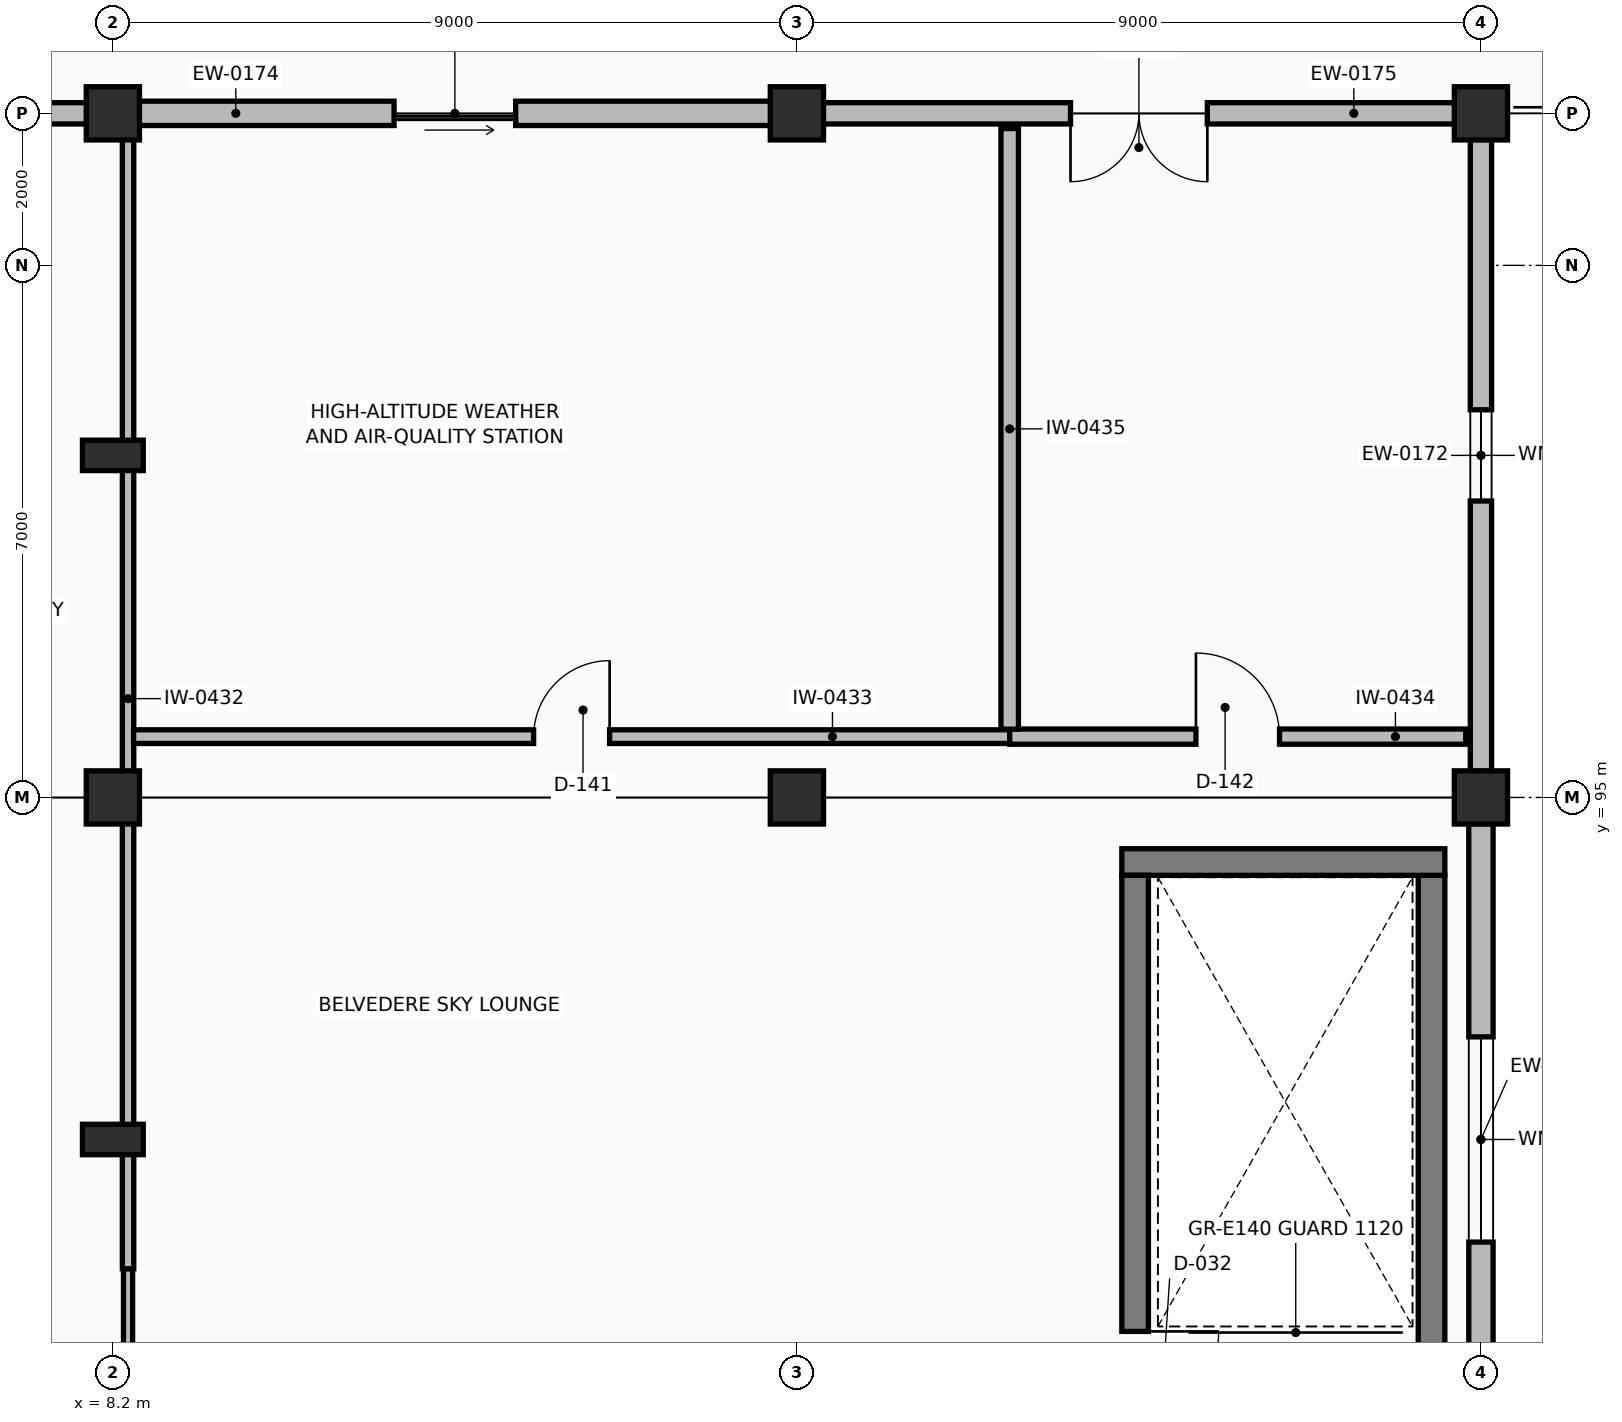
"""IFC4 building model, lengths in metres.
Left out: names, types, materials, properties, quantities, classifications, styles, units other than length and angle.
Written with IfcOpenShell. Run it as: python <this file> out.ifc"""

import sys

from ifc_helpers import new_model, si_unit, direction, frame, frame_2d, origin, origin_2d, place, context, subcontext, project, spatial, rectangle, extrude, element, fill, save


model = new_model("IFC4")
c1 = context("Model", 3, precision=1e-05, world=origin(), true_north=direction((0.0, 1.0)))
c2 = subcontext(c1, "Body", "Model", "MODEL_VIEW")
j1 = project(units=[si_unit("LENGTHUNIT", "METRE"), si_unit("PLANEANGLEUNIT", "RADIAN")], contexts=[c1])
p1 = place(None, origin())
s1 = spatial("IfcSite", under=j1, at=p1, CompositionType="ELEMENT")
p2 = place(p1, origin())
s2 = spatial("IfcBuilding", under=s1, at=p2, CompositionType="ELEMENT")
p3 = place(p2, frame((0.0, 0.0, 18.9)))
s3 = spatial("IfcBuildingStorey", under=s2, at=p3, CompositionType="ELEMENT", Elevation=18.9)
for number, where, z_axis, x_axis in (
    (1, (8.2, 95.0, 0.0), (0.0, 0.0, 1.0), (1.0, 0.0, 0.0)),
    (2, (8.2, 104.0, 0.0), (0.0, 0.0, 1.0), (1.0, 0.0, 0.0)),
    (3, (17.2, 95.0, 0.0), (0.0, 0.0, 1.0), (1.0, 0.0, 0.0)),
    (4, (17.2, 104.0, 0.0), (0.0, 0.0, 1.0), (1.0, 0.0, 0.0)),
    (5, (26.2, 95.0, 0.0), (0.0, 0.0, 1.0), (1.0, 0.0, 0.0)),
    (6, (26.2, 104.0, 0.0), (0.0, 0.0, 1.0), (1.0, 0.0, 0.0)),
):
    element("IfcColumn", number, at=place(p3, frame(where, z_axis=z_axis, x_axis=x_axis)), inside=s3, PredefinedType="COLUMN", context=c2, shape_type="SweptSolid", body=[
        extrude(rectangle(XDim=0.7, YDim=0.7, at=origin_2d()), origin(), (0.0, 0.0, 1.0), 4.5),
    ])
for number, where, z_axis, x_axis in (
    (7, (8.2, 90.5, 0.0), (0.0, 0.0, 1.0), (0.0, 1.0, 0.0)),
    (8, (8.2, 99.5, 0.0), (0.0, 0.0, 1.0), (0.0, 1.0, 0.0)),
):
    element("IfcColumn", number, at=place(p3, frame(where, z_axis=z_axis, x_axis=x_axis)), inside=s3, PredefinedType="PILASTER", context=c2, shape_type="SweptSolid", body=[
        extrude(rectangle(XDim=0.4, YDim=0.8, at=origin_2d()), origin(), (0.0, 0.0, 1.0), 4.5),
    ])
p4 = place(p3, frame((26.2, 86.345, 0.0), z_axis=(0.0, 0.0, 1.0), x_axis=(0.0, 1.0, 0.0)))
e9 = element("IfcWall", 9, at=p4, inside=s3, PredefinedType="SOLIDWALL", context=c2, shape_type="SweptSolid", body=[
    extrude(rectangle(XDim=8.31, YDim=0.32, at=frame_2d((4.155, 0.0))), origin(), (0.0, 0.0, 1.0), 4.19),
])
p5 = place(p4, frame((2.805, 0.0, 0.9)))
e10 = element("IfcOpeningElement", 10, at=p5, cuts=e9, PredefinedType="OPENING", context=c2, shape_type="SweptSolid", body=[
    extrude(rectangle(XDim=2.7, YDim=1.5, at=frame_2d((1.35, 0.75))), frame((0.0, 0.17, 0.0), z_axis=(0.0, -1.0, 0.0), x_axis=(1.0, 0.0, 0.0)), (0.0, 0.0, 1.0), 0.34),
])
p6 = place(p3, frame((26.2, 95.345, 0.0), z_axis=(0.0, 0.0, 1.0), x_axis=(0.0, 1.0, 0.0)))
e11 = element("IfcWall", 11, at=p6, inside=s3, PredefinedType="SOLIDWALL", context=c2, shape_type="SweptSolid", body=[
    extrude(rectangle(XDim=8.31, YDim=0.28, at=frame_2d((4.155, 0.0))), origin(), (0.0, 0.0, 1.0), 4.19),
])
p7 = place(p6, frame((3.555, 0.0, 0.9)))
e12 = element("IfcOpeningElement", 12, at=p7, cuts=e11, PredefinedType="OPENING", context=c2, shape_type="SweptSolid", body=[
    extrude(rectangle(XDim=1.2, YDim=1.5, at=frame_2d((0.6, 0.75))), frame((0.0, 0.15, 0.0), z_axis=(0.0, -1.0, 0.0), x_axis=(1.0, 0.0, 0.0)), (0.0, 0.0, 1.0), 0.3),
])
p8 = place(p3, frame((7.855, 104.0, 0.0), z_axis=(0.0, 0.0, 1.0), x_axis=(-1.0, 0.0, 0.0)))
e13 = element("IfcWall", 13, at=p8, inside=s3, PredefinedType="SOLIDWALL", context=c2, shape_type="SweptSolid", body=[
    extrude(rectangle(XDim=4.855, YDim=0.28, at=frame_2d((2.427, 0.0))), origin(), (0.0, 0.0, 1.0), 4.19),
])
p9 = place(p3, frame((16.855, 104.0, 0.0), z_axis=(0.0, 0.0, 1.0), x_axis=(-1.0, 0.0, 0.0)))
e14 = element("IfcWall", 14, at=p9, inside=s3, PredefinedType="SOLIDWALL", context=c2, shape_type="SweptSolid", body=[
    extrude(rectangle(XDim=8.31, YDim=0.32, at=frame_2d((4.155, 0.0))), origin(), (0.0, 0.0, 1.0), 4.19),
])
p10 = place(p9, frame((3.355, 0.0, 0.0)))
e15 = element("IfcOpeningElement", 15, at=p10, cuts=e14, PredefinedType="OPENING", context=c2, shape_type="SweptSolid", body=[
    extrude(rectangle(XDim=1.6, YDim=2.3, at=frame_2d((0.8, 1.15))), frame((0.0, 0.17, 0.0), z_axis=(0.0, -1.0, 0.0), x_axis=(1.0, 0.0, 0.0)), (0.0, 0.0, 1.0), 0.34),
])
p11 = place(p3, frame((25.855, 104.0, 0.0), z_axis=(0.0, 0.0, 1.0), x_axis=(-1.0, 0.0, 0.0)))
e16 = element("IfcWall", 16, at=p11, inside=s3, PredefinedType="SOLIDWALL", context=c2, shape_type="SweptSolid", body=[
    extrude(rectangle(XDim=8.31, YDim=0.28, at=frame_2d((4.155, 0.0))), origin(), (0.0, 0.0, 1.0), 4.19),
])
p12 = place(p11, frame((3.255, 0.0, 0.0)))
e17 = element("IfcOpeningElement", 17, at=p12, cuts=e16, PredefinedType="OPENING", context=c2, shape_type="SweptSolid", body=[
    extrude(rectangle(XDim=1.8, YDim=2.3, at=frame_2d((0.9, 1.15))), frame((0.0, 0.15, 0.0), z_axis=(0.0, -1.0, 0.0), x_axis=(1.0, 0.0, 0.0)), (0.0, 0.0, 1.0), 0.3),
])
p13 = place(p3, frame((25.55, 86.425, 0.0), z_axis=(0.0, 0.0, 1.0), x_axis=(0.0, 1.0, 0.0)))
e18 = element("IfcWall", 18, at=p13, inside=s3, PredefinedType="SHEAR", context=c2, shape_type="SweptSolid", body=[
    extrude(rectangle(XDim=7.55, YDim=0.35, at=frame_2d((3.775, 0.0))), origin(), (0.0, 0.0, 1.0), 4.28),
])
p14 = place(p3, frame((25.725, 94.15, 0.0), z_axis=(0.0, 0.0, 1.0), x_axis=(-1.0, 0.0, 0.0)))
e19 = element("IfcWall", 19, at=p14, inside=s3, PredefinedType="SHEAR", context=c2, shape_type="SweptSolid", body=[
    extrude(rectangle(XDim=4.25, YDim=0.35, at=frame_2d((2.125, 0.0))), origin(), (0.0, 0.0, 1.0), 4.28),
])
p15 = place(p3, frame((21.65, 93.975, 0.0), z_axis=(0.0, 0.0, 1.0), x_axis=(0.0, -1.0, 0.0)))
e20 = element("IfcWall", 20, at=p15, inside=s3, PredefinedType="SHEAR", context=c2, shape_type="SweptSolid", body=[
    extrude(rectangle(XDim=7.55, YDim=0.35, at=frame_2d((3.775, 0.0))), origin(), (0.0, 0.0, 1.0), 4.28),
])
p16 = place(p15, frame((6.0, 0.0, 0.0)))
e21 = element("IfcOpeningElement", 21, at=p16, cuts=e20, PredefinedType="OPENING", context=c2, shape_type="SweptSolid", body=[
    extrude(rectangle(XDim=1.1, YDim=2.2, at=frame_2d((0.55, 1.1))), frame((0.0, 0.185, 0.0), z_axis=(0.0, -1.0, 0.0), x_axis=(1.0, 0.0, 0.0)), (0.0, 0.0, 1.0), 0.37),
])
p17 = place(p3, frame((8.4, 85.8, 0.0), z_axis=(0.0, 0.0, 1.0), x_axis=(0.0, 1.0, 0.0)))
e22 = element("IfcWall", 22, at=p17, inside=s3, PredefinedType="PARTITIONING", context=c2, shape_type="SweptSolid", body=[
    extrude(rectangle(XDim=3.0, YDim=0.12, at=frame_2d((1.5, 0.0))), origin(), (0.0, 0.0, 1.0), 4.135),
])
p18 = place(p17, frame((1.0, 0.0, 0.0)))
e23 = element("IfcOpeningElement", 23, at=p18, cuts=e22, PredefinedType="OPENING", context=c2, shape_type="SweptSolid", body=[
    extrude(rectangle(XDim=1.0, YDim=2.15, at=frame_2d((0.5, 1.075))), frame((0.0, 0.07, 0.0), z_axis=(0.0, -1.0, 0.0), x_axis=(1.0, 0.0, 0.0)), (0.0, 0.0, 1.0), 0.14),
])
p19 = place(p3, frame((8.4, 88.8, 0.0), z_axis=(0.0, 0.0, 1.0), x_axis=(0.0, 1.0, 0.0)))
e24 = element("IfcWall", 24, at=p19, inside=s3, PredefinedType="PARTITIONING", context=c2, shape_type="SweptSolid", body=[
    extrude(rectangle(XDim=15.0, YDim=0.15, at=frame_2d((7.5, 0.0))), origin(), (0.0, 0.0, 1.0), 4.135),
])
p20 = place(p3, frame((8.473, 95.8, 0.0), z_axis=(0.0, 0.0, 1.0), x_axis=(1.0, 0.0, 0.0)))
e25 = element("IfcWall", 25, at=p20, inside=s3, PredefinedType="STANDARD", context=c2, shape_type="SweptSolid", body=[
    extrude(rectangle(XDim=11.527, YDim=0.18, at=frame_2d((5.764, 0.0))), origin(), (0.0, 0.0, 1.0), 4.135),
])
p21 = place(p20, frame((5.263, 0.0, 0.0)))
e26 = element("IfcOpeningElement", 26, at=p21, cuts=e25, PredefinedType="OPENING", context=c2, shape_type="SweptSolid", body=[
    extrude(rectangle(XDim=1.0, YDim=2.15, at=frame_2d((0.5, 1.075))), frame((0.0, 0.1, 0.0), z_axis=(0.0, -1.0, 0.0), x_axis=(1.0, 0.0, 0.0)), (0.0, 0.0, 1.0), 0.2),
])
p22 = place(p3, frame((20.0, 95.8, 0.0), z_axis=(0.0, 0.0, 1.0), x_axis=(1.0, 0.0, 0.0)))
e27 = element("IfcWall", 27, at=p22, inside=s3, PredefinedType="PARTITIONING", context=c2, shape_type="SweptSolid", body=[
    extrude(rectangle(XDim=6.0, YDim=0.2, at=frame_2d((3.0, 0.0))), origin(), (0.0, 0.0, 1.0), 4.135),
])
p23 = place(p22, frame((2.45, 0.0, 0.0)))
e28 = element("IfcOpeningElement", 28, at=p23, cuts=e27, PredefinedType="OPENING", context=c2, shape_type="SweptSolid", body=[
    extrude(rectangle(XDim=1.1, YDim=2.2, at=frame_2d((0.55, 1.1))), frame((0.0, 0.11, 0.0), z_axis=(0.0, -1.0, 0.0), x_axis=(1.0, 0.0, 0.0)), (0.0, 0.0, 1.0), 0.22),
])
p24 = place(p3, frame((20.0, 95.898, 0.0), z_axis=(0.0, 0.0, 1.0), x_axis=(0.0, 1.0, 0.0)))
e29 = element("IfcWall", 29, at=p24, inside=s3, PredefinedType="PARTITIONING", context=c2, shape_type="SweptSolid", body=[
    extrude(rectangle(XDim=7.902, YDim=0.23, at=frame_2d((3.951, 0.0))), origin(), (0.0, 0.0, 1.0), 4.135),
])
p25 = place(p5, origin())
e30 = element("IfcWindow", 30, at=p25, inside=s3, PartitioningType="SINGLE_PANEL", PredefinedType="WINDOW", context=c2, shape_type="SweptSolid", body=[
    extrude(rectangle(XDim=2.7, YDim=1.5, at=frame_2d((1.35, 0.75))), frame((0.0, 0.03, 0.0), z_axis=(0.0, -1.0, 0.0), x_axis=(1.0, 0.0, 0.0)), (0.0, 0.0, 1.0), 0.06),
])
fill(e10, e30)
p26 = place(p7, origin())
e31 = element("IfcWindow", 31, at=p26, inside=s3, PartitioningType="SINGLE_PANEL", PredefinedType="WINDOW", context=c2, shape_type="SweptSolid", body=[
    extrude(rectangle(XDim=1.2, YDim=1.5, at=frame_2d((0.6, 0.75))), frame((0.0, 0.03, 0.0), z_axis=(0.0, -1.0, 0.0), x_axis=(1.0, 0.0, 0.0)), (0.0, 0.0, 1.0), 0.06),
])
fill(e12, e31)
p27 = place(p10, origin())
e32 = element("IfcDoor", 32, at=p27, inside=s3, OperationType="SLIDING_TO_LEFT", PredefinedType="DOOR", context=c2, shape_type="SweptSolid", body=[
    extrude(rectangle(XDim=1.6, YDim=2.3, at=frame_2d((0.8, 1.15))), frame((0.0, 0.025, 0.0), z_axis=(0.0, -1.0, 0.0), x_axis=(1.0, 0.0, 0.0)), (0.0, 0.0, 1.0), 0.05),
])
fill(e15, e32)
p28 = place(p12, origin())
e33 = element("IfcDoor", 33, at=p28, inside=s3, OperationType="DOUBLE_SWING_LEFT", PredefinedType="DOOR", context=c2, shape_type="SweptSolid", body=[
    extrude(rectangle(XDim=1.8, YDim=2.3, at=frame_2d((0.9, 1.15))), frame((0.0, 0.025, 0.0), z_axis=(0.0, -1.0, 0.0), x_axis=(1.0, 0.0, 0.0)), (0.0, 0.0, 1.0), 0.05),
])
fill(e17, e33)
p29 = place(p16, origin())
e34 = element("IfcDoor", 34, at=p29, inside=s3, OperationType="SINGLE_SWING_LEFT", PredefinedType="DOOR", context=c2, shape_type="SweptSolid", body=[
    extrude(rectangle(XDim=1.1, YDim=2.2, at=frame_2d((0.55, 1.1))), frame((0.0, 0.025, 0.0), z_axis=(0.0, -1.0, 0.0), x_axis=(1.0, 0.0, 0.0)), (0.0, 0.0, 1.0), 0.05),
])
fill(e21, e34)
p30 = place(p21, origin())
e35 = element("IfcDoor", 35, at=p30, inside=s3, OperationType="SINGLE_SWING_RIGHT", PredefinedType="DOOR", context=c2, shape_type="SweptSolid", body=[
    extrude(rectangle(XDim=1.0, YDim=2.15, at=frame_2d((0.5, 1.075))), frame((0.0, 0.025, 0.0), z_axis=(0.0, -1.0, 0.0), x_axis=(1.0, 0.0, 0.0)), (0.0, 0.0, 1.0), 0.05),
])
fill(e26, e35)
p31 = place(p23, origin())
e36 = element("IfcDoor", 36, at=p31, inside=s3, OperationType="SINGLE_SWING_LEFT", PredefinedType="DOOR", context=c2, shape_type="SweptSolid", body=[
    extrude(rectangle(XDim=1.1, YDim=2.2, at=frame_2d((0.55, 1.1))), frame((0.0, 0.025, 0.0), z_axis=(0.0, -1.0, 0.0), x_axis=(1.0, 0.0, 0.0)), (0.0, 0.0, 1.0), 0.05),
])
fill(e28, e36)
save(model, sys.argv[1])
